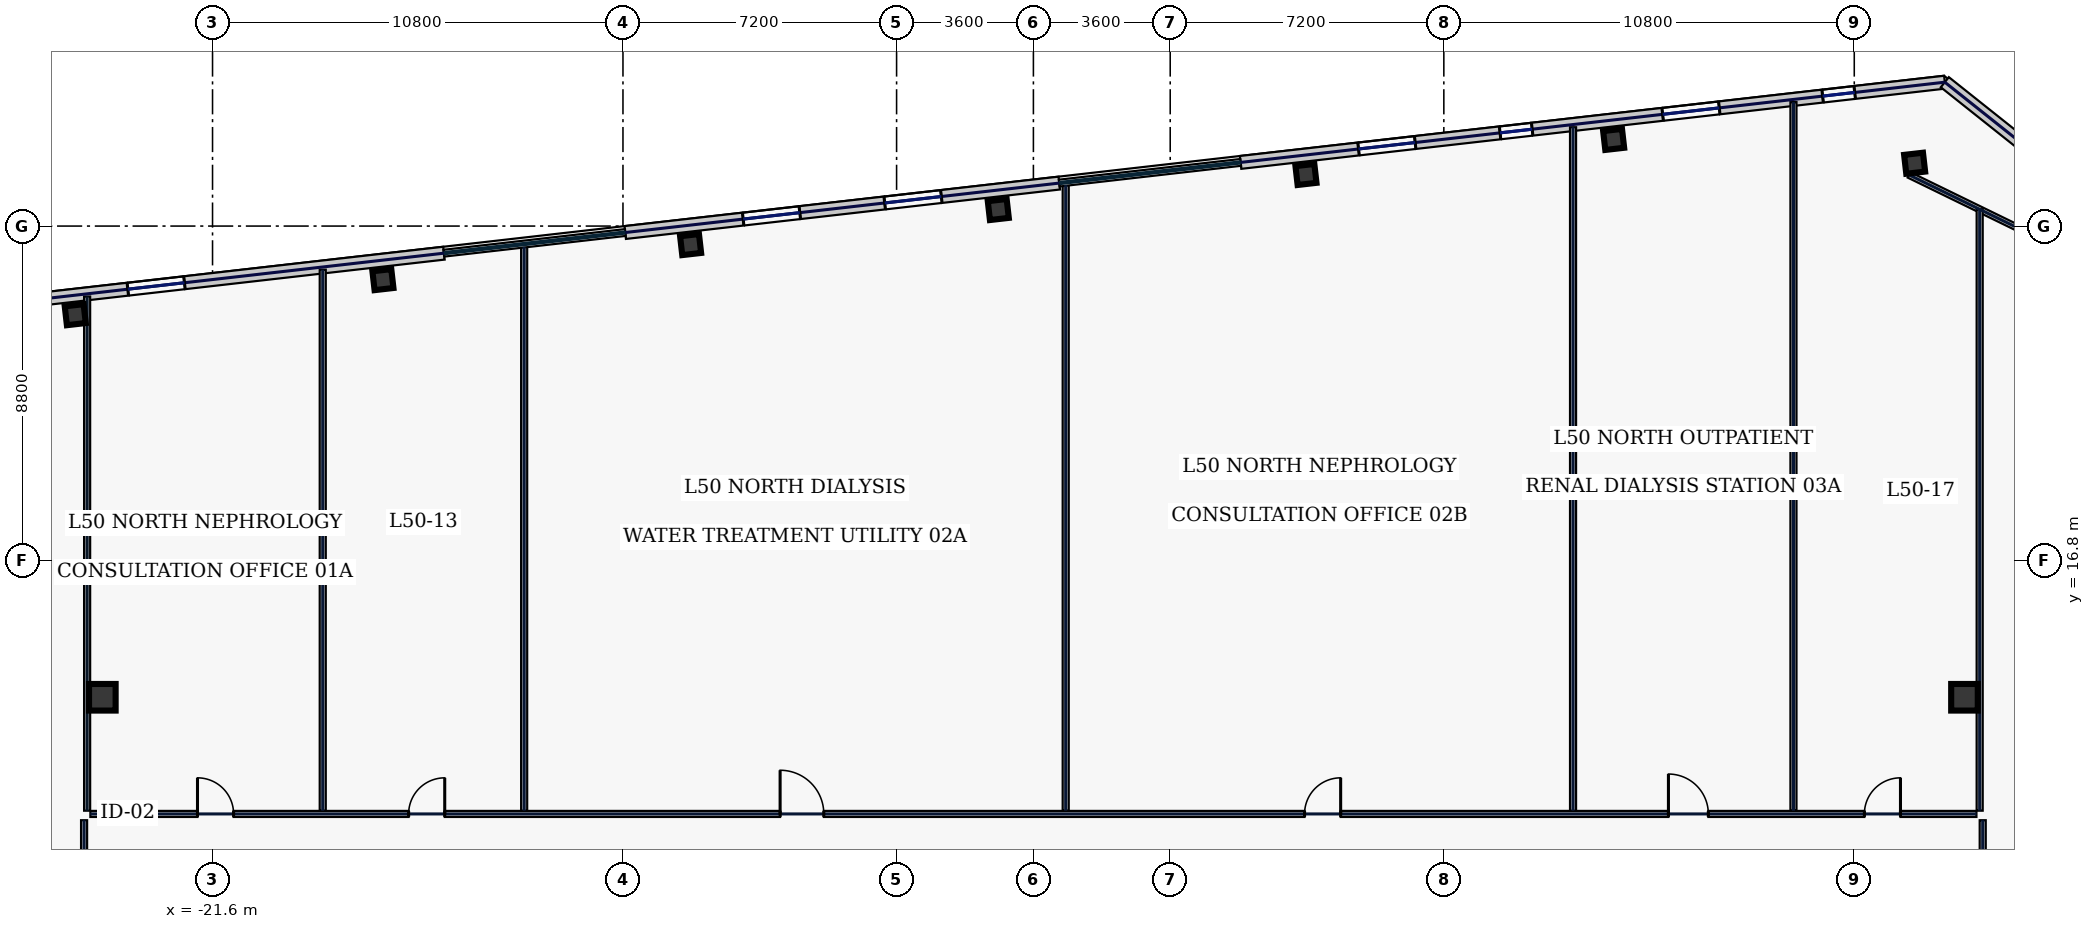
"""IFC4 building model, lengths in metres.
Left out: names, types, materials, properties, quantities, classifications, styles, units other than length and angle.
Written with IfcOpenShell. Run it as: python <this file> out.ifc"""

import sys

from ifc_helpers import new_model, si_unit, direction, frame, frame_2d, origin, origin_2d, place, context, subcontext, project, spatial, rectangle, hollow_rectangle, extrude, element, fill, save


model = new_model("IFC4")
c1 = context("Model", 3, precision=1e-05, world=origin(), true_north=direction((0.0, 1.0)))
c2 = subcontext(c1, "Body", "Model", "MODEL_VIEW")
j1 = project(units=[si_unit("LENGTHUNIT", "METRE"), si_unit("PLANEANGLEUNIT", "RADIAN")], contexts=[c1])
p1 = place(None, origin())
s1 = spatial("IfcSite", under=j1, at=p1, CompositionType="ELEMENT")
p2 = place(p1, origin())
s2 = spatial("IfcBuilding", under=s1, at=p2, CompositionType="ELEMENT")
p3 = place(p2, frame((0.0, 0.0, 218.2)))
s3 = spatial("IfcBuildingStorey", under=s2, at=p3, CompositionType="ELEMENT", Elevation=218.2)
for number, where, z_axis, x_axis in (
    (1, (-24.5, 13.2, 0.0), (0.0, 0.0, 1.0), (1.0, 0.0, 0.0)),
    (2, (24.5, 13.2, 0.0), (0.0, 0.0, 1.0), (1.0, 0.0, 0.0)),
):
    element("IfcColumn", number, at=place(p3, frame(where, z_axis=z_axis, x_axis=x_axis)), inside=s3, PredefinedType="COLUMN", context=c2, shape_type="SweptSolid", body=[
        extrude(hollow_rectangle(XDim=0.7, YDim=0.7, WallThickness=0.032, at=origin_2d()), origin(), (0.0, 0.0, 1.0), 3.74),
    ])
for number, where, z_axis, x_axis in (
    (3, (23.188, 27.253, 0.0), (0.0, 0.0, 1.0), (0.994, 0.113, 0.0)),
    (4, (15.269, 27.88, 0.0), (0.0, 0.0, 1.0), (0.994, 0.113, 0.0)),
    (5, (7.172, 26.958, 0.0), (0.0, 0.0, 1.0), (0.994, 0.113, 0.0)),
    (6, (-0.924, 26.035, 0.0), (0.0, 0.0, 1.0), (0.994, 0.113, 0.0)),
    (7, (-9.02, 25.113, 0.0), (0.0, 0.0, 1.0), (0.994, 0.113, 0.0)),
    (8, (-17.116, 24.19, 0.0), (0.0, 0.0, 1.0), (0.994, 0.113, 0.0)),
    (9, (-25.212, 23.268, 0.0), (0.0, 0.0, 1.0), (0.994, 0.113, 0.0)),
):
    element("IfcColumn", number, at=place(p3, frame(where, z_axis=z_axis, x_axis=x_axis)), inside=s3, PredefinedType="COLUMN", context=c2, shape_type="SweptSolid", body=[
        extrude(hollow_rectangle(XDim=0.5, YDim=0.5, WallThickness=0.025, at=origin_2d()), origin(), (0.0, 0.0, 1.0), 3.74),
    ])
p4 = place(p3, frame((23.983, 29.386, 0.0), z_axis=(0.0, 0.0, 1.0), x_axis=(-0.993572271362, -0.113199565282, 0.0)))
e10 = element("IfcWall", 10, at=p4, inside=s3, PredefinedType="STANDARD", context=c2, shape_type="SweptSolid", body=[
    extrude(rectangle(XDim=18.651, YDim=0.34, at=frame_2d((9.326, 0.0))), origin(), (0.0, 0.0, 1.0), 3.74),
])
p5 = place(p4, frame((14.027, 0.0, 0.83)))
e11 = element("IfcOpeningElement", 11, at=p5, cuts=e10, PredefinedType="OPENING", context=c2, shape_type="SweptSolid", body=[
    extrude(rectangle(XDim=1.5, YDim=2.0, at=frame_2d((0.75, 1.0))), frame((0.0, 0.18, 0.0), z_axis=(0.0, -1.0, 0.0), x_axis=(1.0, 0.0, 0.0)), (0.0, 0.0, 1.0), 0.36),
])
p6 = place(p4, frame((10.929, 0.0, 0.83)))
e12 = element("IfcOpeningElement", 12, at=p6, cuts=e10, PredefinedType="OPENING", context=c2, shape_type="SweptSolid", body=[
    extrude(rectangle(XDim=0.85, YDim=1.85, at=frame_2d((0.425, 0.925))), frame((0.0, 0.18, 0.0), z_axis=(0.0, -1.0, 0.0), x_axis=(1.0, 0.0, 0.0)), (0.0, 0.0, 1.0), 0.36),
])
p7 = place(p4, frame((5.973, 0.0, 0.83)))
e13 = element("IfcOpeningElement", 13, at=p7, cuts=e10, PredefinedType="OPENING", context=c2, shape_type="SweptSolid", body=[
    extrude(rectangle(XDim=1.5, YDim=2.0, at=frame_2d((0.75, 1.0))), frame((0.0, 0.18, 0.0), z_axis=(0.0, -1.0, 0.0), x_axis=(1.0, 0.0, 0.0)), (0.0, 0.0, 1.0), 0.36),
])
p8 = place(p4, frame((2.386, 0.0, 0.83)))
e14 = element("IfcOpeningElement", 14, at=p8, cuts=e10, PredefinedType="OPENING", context=c2, shape_type="SweptSolid", body=[
    extrude(rectangle(XDim=0.85, YDim=1.85, at=frame_2d((0.425, 0.925))), frame((0.0, 0.18, 0.0), z_axis=(0.0, -1.0, 0.0), x_axis=(1.0, 0.0, 0.0)), (0.0, 0.0, 1.0), 0.36),
])
p9 = place(p3, frame((0.682, 26.731, 0.0), z_axis=(0.0, 0.0, 1.0), x_axis=(-0.993571968199, -0.113202226169, 0.0)))
e15 = element("IfcWall", 15, at=p9, inside=s3, PredefinedType="STANDARD", context=c2, shape_type="SweptSolid", body=[
    extrude(rectangle(XDim=11.497, YDim=0.34, at=frame_2d((5.749, 0.0))), origin(), (0.0, 0.0, 1.0), 3.74),
])
p10 = place(p9, frame((6.873, 0.0, 0.83)))
e16 = element("IfcOpeningElement", 16, at=p10, cuts=e15, PredefinedType="OPENING", context=c2, shape_type="SweptSolid", body=[
    extrude(rectangle(XDim=1.5, YDim=2.0, at=frame_2d((0.75, 1.0))), frame((0.0, 0.18, 0.0), z_axis=(0.0, -1.0, 0.0), x_axis=(1.0, 0.0, 0.0)), (0.0, 0.0, 1.0), 0.36),
])
p11 = place(p9, frame((3.125, 0.0, 0.83)))
e17 = element("IfcOpeningElement", 17, at=p11, cuts=e15, PredefinedType="OPENING", context=c2, shape_type="SweptSolid", body=[
    extrude(rectangle(XDim=1.5, YDim=2.0, at=frame_2d((0.75, 1.0))), frame((0.0, 0.18, 0.0), z_axis=(0.0, -1.0, 0.0), x_axis=(1.0, 0.0, 0.0)), (0.0, 0.0, 1.0), 0.36),
])
p12 = place(p3, frame((-15.51, 24.886, 0.0), z_axis=(0.0, 0.0, 1.0), x_axis=(-0.993572271362, -0.113199565282, 0.0)))
e18 = element("IfcWall", 18, at=p12, inside=s3, PredefinedType="STANDARD", context=c2, shape_type="SweptSolid", body=[
    extrude(rectangle(XDim=18.651, YDim=0.34, at=frame_2d((9.326, 0.0))), origin(), (0.0, 0.0, 1.0), 3.74),
])
p13 = place(p12, frame((15.021, 0.0, 0.83)))
e19 = element("IfcOpeningElement", 19, at=p13, cuts=e18, PredefinedType="OPENING", context=c2, shape_type="SweptSolid", body=[
    extrude(rectangle(XDim=1.5, YDim=2.0, at=frame_2d((0.75, 1.0))), frame((0.0, 0.18, 0.0), z_axis=(0.0, -1.0, 0.0), x_axis=(1.0, 0.0, 0.0)), (0.0, 0.0, 1.0), 0.36),
])
p14 = place(p12, frame((11.273, 0.0, 0.83)))
e20 = element("IfcOpeningElement", 20, at=p14, cuts=e18, PredefinedType="OPENING", context=c2, shape_type="SweptSolid", body=[
    extrude(rectangle(XDim=1.5, YDim=2.0, at=frame_2d((0.75, 1.0))), frame((0.0, 0.18, 0.0), z_axis=(0.0, -1.0, 0.0), x_axis=(1.0, 0.0, 0.0)), (0.0, 0.0, 1.0), 0.36),
])
p15 = place(p12, frame((6.873, 0.0, 0.83)))
e21 = element("IfcOpeningElement", 21, at=p15, cuts=e18, PredefinedType="OPENING", context=c2, shape_type="SweptSolid", body=[
    extrude(rectangle(XDim=1.5, YDim=2.0, at=frame_2d((0.75, 1.0))), frame((0.0, 0.18, 0.0), z_axis=(0.0, -1.0, 0.0), x_axis=(1.0, 0.0, 0.0)), (0.0, 0.0, 1.0), 0.36),
])
p16 = place(p3, frame((29.107, 25.31, 0.0), z_axis=(0.0, 0.0, 1.0), x_axis=(-0.78259733853, 0.62252823689, 0.0)))
e22 = element("IfcWall", 22, at=p16, inside=s3, PredefinedType="STANDARD", context=c2, shape_type="SweptSolid", body=[
    extrude(rectangle(XDim=6.548, YDim=0.34, at=frame_2d((3.274, 0.0))), origin(), (0.0, 0.0, 1.0), 3.74),
])
p17 = place(p3, frame((28.528, 24.271, 0.0), z_axis=(0.0, 0.0, 1.0), x_axis=(-0.898820692789, 0.438316509173, 0.0)))
e23 = element("IfcWall", 23, at=p17, inside=s3, PredefinedType="PARTITIONING", context=c2, shape_type="SweptSolid", body=[
    extrude(rectangle(XDim=6.107, YDim=0.16, at=frame_2d((3.053, 0.0))), origin(), (0.0, 0.0, 1.0), 3.74),
])
p18 = place(p3, frame((-24.98, 6.985, 0.0), z_axis=(0.0, 0.0, 1.0), x_axis=(0.0, 1.0, 0.0)))
e24 = element("IfcWall", 24, at=p18, inside=s3, PredefinedType="PARTITIONING", context=c2, shape_type="SweptSolid", body=[
    extrude(rectangle(XDim=2.98, YDim=0.16, at=frame_2d((1.49, 0.0))), origin(), (0.0, 0.0, 1.0), 3.74),
])
p19 = place(p18, frame((1.1, 0.0, 0.0)))
e25 = element("IfcOpeningElement", 25, at=p19, cuts=e24, PredefinedType="OPENING", context=c2, shape_type="SweptSolid", body=[
    extrude(rectangle(XDim=0.95, YDim=2.2, at=frame_2d((0.475, 1.1))), frame((0.0, 0.09, 0.0), z_axis=(0.0, -1.0, 0.0), x_axis=(1.0, 0.0, 0.0)), (0.0, 0.0, 1.0), 0.18),
])
p20 = place(p3, frame((-24.815, 10.13, 0.0), z_axis=(0.0, 0.0, 1.0), x_axis=(1.0, 0.0, 0.0)))
e26 = element("IfcWall", 26, at=p20, inside=s3, PredefinedType="PARTITIONING", context=c2, shape_type="SweptSolid", body=[
    extrude(rectangle(XDim=49.63, YDim=0.16, at=frame_2d((24.815, 0.0))), origin(), (0.0, 0.0, 1.0), 3.74),
])
p21 = place(p20, frame((2.819, 0.0, 0.0)))
e27 = element("IfcOpeningElement", 27, at=p21, cuts=e26, PredefinedType="OPENING", context=c2, shape_type="SweptSolid", body=[
    extrude(rectangle(XDim=0.95, YDim=2.2, at=frame_2d((0.475, 1.1))), frame((0.0, 0.09, 0.0), z_axis=(0.0, -1.0, 0.0), x_axis=(1.0, 0.0, 0.0)), (0.0, 0.0, 1.0), 0.18),
])
p22 = place(p20, frame((8.375, 0.0, 0.0)))
e28 = element("IfcOpeningElement", 28, at=p22, cuts=e26, PredefinedType="OPENING", context=c2, shape_type="SweptSolid", body=[
    extrude(rectangle(XDim=0.95, YDim=2.2, at=frame_2d((0.475, 1.1))), frame((0.0, 0.09, 0.0), z_axis=(0.0, -1.0, 0.0), x_axis=(1.0, 0.0, 0.0)), (0.0, 0.0, 1.0), 0.18),
])
p23 = place(p20, frame((18.15, 0.0, 0.0)))
e29 = element("IfcOpeningElement", 29, at=p23, cuts=e26, PredefinedType="OPENING", context=c2, shape_type="SweptSolid", body=[
    extrude(rectangle(XDim=1.15, YDim=2.2, at=frame_2d((0.575, 1.1))), frame((0.0, 0.09, 0.0), z_axis=(0.0, -1.0, 0.0), x_axis=(1.0, 0.0, 0.0)), (0.0, 0.0, 1.0), 0.18),
])
p24 = place(p20, frame((31.95, 0.0, 0.0)))
e30 = element("IfcOpeningElement", 30, at=p24, cuts=e26, PredefinedType="OPENING", context=c2, shape_type="SweptSolid", body=[
    extrude(rectangle(XDim=0.95, YDim=2.2, at=frame_2d((0.475, 1.1))), frame((0.0, 0.09, 0.0), z_axis=(0.0, -1.0, 0.0), x_axis=(1.0, 0.0, 0.0)), (0.0, 0.0, 1.0), 0.18),
])
p25 = place(p20, frame((41.525, 0.0, 0.0)))
e31 = element("IfcOpeningElement", 31, at=p25, cuts=e26, PredefinedType="OPENING", context=c2, shape_type="SweptSolid", body=[
    extrude(rectangle(XDim=1.05, YDim=2.2, at=frame_2d((0.525, 1.1))), frame((0.0, 0.09, 0.0), z_axis=(0.0, -1.0, 0.0), x_axis=(1.0, 0.0, 0.0)), (0.0, 0.0, 1.0), 0.18),
])
p26 = place(p20, frame((46.681, 0.0, 0.0)))
e32 = element("IfcOpeningElement", 32, at=p26, cuts=e26, PredefinedType="OPENING", context=c2, shape_type="SweptSolid", body=[
    extrude(rectangle(XDim=0.95, YDim=2.2, at=frame_2d((0.475, 1.1))), frame((0.0, 0.09, 0.0), z_axis=(0.0, -1.0, 0.0), x_axis=(1.0, 0.0, 0.0)), (0.0, 0.0, 1.0), 0.18),
])
p27 = place(p3, frame((24.98, 9.965, 0.0), z_axis=(0.0, 0.0, 1.0), x_axis=(0.0, -1.0, 0.0)))
e33 = element("IfcWall", 33, at=p27, inside=s3, PredefinedType="PARTITIONING", context=c2, shape_type="SweptSolid", body=[
    extrude(rectangle(XDim=2.98, YDim=0.16, at=frame_2d((1.49, 0.0))), origin(), (0.0, 0.0, 1.0), 3.74),
])
p28 = place(p27, frame((1.1, 0.0, 0.0)))
e34 = element("IfcOpeningElement", 34, at=p28, cuts=e33, PredefinedType="OPENING", context=c2, shape_type="SweptSolid", body=[
    extrude(rectangle(XDim=0.95, YDim=2.2, at=frame_2d((0.475, 1.1))), frame((0.0, 0.09, 0.0), z_axis=(0.0, -1.0, 0.0), x_axis=(1.0, 0.0, 0.0)), (0.0, 0.0, 1.0), 0.18),
])
p29 = place(p3, frame((-24.9, 10.215, 0.0), z_axis=(0.0, 0.0, 1.0), x_axis=(0.0, 1.0, 0.0)))
e35 = element("IfcWall", 35, at=p29, inside=s3, PredefinedType="PARTITIONING", context=c2, shape_type="SweptSolid", body=[
    extrude(rectangle(XDim=13.531, YDim=0.16, at=frame_2d((6.766, 0.0))), origin(), (0.0, 0.0, 1.0), 3.285),
])
p30 = place(p3, frame((24.9, 10.215, 0.0), z_axis=(0.0, 0.0, 1.0), x_axis=(0.0, 1.0, 0.0)))
e36 = element("IfcWall", 36, at=p30, inside=s3, PredefinedType="PARTITIONING", context=c2, shape_type="SweptSolid", body=[
    extrude(rectangle(XDim=15.829, YDim=0.16, at=frame_2d((7.915, 0.0))), origin(), (0.0, 0.0, 1.0), 3.74),
])
p31 = place(p3, frame((-13.4, 10.215, 0.0), z_axis=(0.0, 0.0, 1.0), x_axis=(0.0, 1.0, 0.0)))
e37 = element("IfcWall", 37, at=p31, inside=s3, PredefinedType="PARTITIONING", context=c2, shape_type="SweptSolid", body=[
    extrude(rectangle(XDim=14.841, YDim=0.16, at=frame_2d((7.421, 0.0))), origin(), (0.0, 0.0, 1.0), 3.74),
])
p32 = place(p3, frame((14.2, 10.215, 0.0), z_axis=(0.0, 0.0, 1.0), x_axis=(0.0, 1.0, 0.0)))
e38 = element("IfcWall", 38, at=p32, inside=s3, PredefinedType="PARTITIONING", context=c2, shape_type="SweptSolid", body=[
    extrude(rectangle(XDim=17.986, YDim=0.16, at=frame_2d((8.993, 0.0))), origin(), (0.0, 0.0, 1.0), 3.74),
])
p33 = place(p3, frame((-18.7, 10.215, 0.0), z_axis=(0.0, 0.0, 1.0), x_axis=(0.0, 1.0, 0.0)))
e39 = element("IfcWall", 39, at=p33, inside=s3, PredefinedType="PARTITIONING", context=c2, shape_type="SweptSolid", body=[
    extrude(rectangle(XDim=14.238, YDim=0.16, at=frame_2d((7.119, 0.0))), origin(), (0.0, 0.0, 1.0), 3.74),
])
p34 = place(p3, frame((0.85, 10.215, 0.0), z_axis=(0.0, 0.0, 1.0), x_axis=(0.0, 1.0, 0.0)))
e40 = element("IfcWall", 40, at=p34, inside=s3, PredefinedType="PARTITIONING", context=c2, shape_type="SweptSolid", body=[
    extrude(rectangle(XDim=16.465, YDim=0.16, at=frame_2d((8.232, 0.0))), origin(), (0.0, 0.0, 1.0), 3.74),
])
p35 = place(p3, frame((20.0, 10.215, 0.0), z_axis=(0.0, 0.0, 1.0), x_axis=(0.0, 1.0, 0.0)))
e41 = element("IfcWall", 41, at=p35, inside=s3, PredefinedType="PARTITIONING", context=c2, shape_type="SweptSolid", body=[
    extrude(rectangle(XDim=18.647, YDim=0.16, at=frame_2d((9.323, 0.0))), origin(), (0.0, 0.0, 1.0), 3.74),
])
p36 = place(p5, origin())
e42 = element("IfcWindow", 42, at=p36, inside=s3, PartitioningType="SINGLE_PANEL", PredefinedType="WINDOW", context=c2, shape_type="SweptSolid", body=[
    extrude(rectangle(XDim=1.5, YDim=2.0, at=frame_2d((0.75, 1.0))), frame((0.0, 0.03, 0.0), z_axis=(0.0, -1.0, 0.0), x_axis=(1.0, 0.0, 0.0)), (0.0, 0.0, 1.0), 0.06),
])
fill(e11, e42)
p37 = place(p6, origin())
e43 = element("IfcWindow", 43, at=p37, inside=s3, PartitioningType="SINGLE_PANEL", PredefinedType="WINDOW", context=c2, shape_type="SweptSolid", body=[
    extrude(rectangle(XDim=0.85, YDim=1.85, at=frame_2d((0.425, 0.925))), frame((0.0, 0.03, 0.0), z_axis=(0.0, -1.0, 0.0), x_axis=(1.0, 0.0, 0.0)), (0.0, 0.0, 1.0), 0.06),
])
fill(e12, e43)
p38 = place(p7, origin())
e44 = element("IfcWindow", 44, at=p38, inside=s3, PartitioningType="SINGLE_PANEL", PredefinedType="WINDOW", context=c2, shape_type="SweptSolid", body=[
    extrude(rectangle(XDim=1.5, YDim=2.0, at=frame_2d((0.75, 1.0))), frame((0.0, 0.03, 0.0), z_axis=(0.0, -1.0, 0.0), x_axis=(1.0, 0.0, 0.0)), (0.0, 0.0, 1.0), 0.06),
])
fill(e13, e44)
p39 = place(p8, origin())
e45 = element("IfcWindow", 45, at=p39, inside=s3, PartitioningType="SINGLE_PANEL", PredefinedType="WINDOW", context=c2, shape_type="SweptSolid", body=[
    extrude(rectangle(XDim=0.85, YDim=1.85, at=frame_2d((0.425, 0.925))), frame((0.0, 0.03, 0.0), z_axis=(0.0, -1.0, 0.0), x_axis=(1.0, 0.0, 0.0)), (0.0, 0.0, 1.0), 0.06),
])
fill(e14, e45)
p40 = place(p10, origin())
e46 = element("IfcWindow", 46, at=p40, inside=s3, PartitioningType="SINGLE_PANEL", PredefinedType="WINDOW", context=c2, shape_type="SweptSolid", body=[
    extrude(rectangle(XDim=1.5, YDim=2.0, at=frame_2d((0.75, 1.0))), frame((0.0, 0.03, 0.0), z_axis=(0.0, -1.0, 0.0), x_axis=(1.0, 0.0, 0.0)), (0.0, 0.0, 1.0), 0.06),
])
fill(e16, e46)
p41 = place(p11, origin())
e47 = element("IfcWindow", 47, at=p41, inside=s3, PartitioningType="SINGLE_PANEL", PredefinedType="WINDOW", context=c2, shape_type="SweptSolid", body=[
    extrude(rectangle(XDim=1.5, YDim=2.0, at=frame_2d((0.75, 1.0))), frame((0.0, 0.03, 0.0), z_axis=(0.0, -1.0, 0.0), x_axis=(1.0, 0.0, 0.0)), (0.0, 0.0, 1.0), 0.06),
])
fill(e17, e47)
p42 = place(p15, origin())
e48 = element("IfcWindow", 48, at=p42, inside=s3, PartitioningType="SINGLE_PANEL", PredefinedType="WINDOW", context=c2, shape_type="SweptSolid", body=[
    extrude(rectangle(XDim=1.5, YDim=2.0, at=frame_2d((0.75, 1.0))), frame((0.0, 0.03, 0.0), z_axis=(0.0, -1.0, 0.0), x_axis=(1.0, 0.0, 0.0)), (0.0, 0.0, 1.0), 0.06),
])
fill(e21, e48)
p43 = place(p21, origin())
e49 = element("IfcDoor", 49, at=p43, inside=s3, OperationType="SINGLE_SWING_LEFT", PredefinedType="DOOR", context=c2, shape_type="SweptSolid", body=[
    extrude(rectangle(XDim=0.95, YDim=2.2, at=frame_2d((0.475, 1.1))), frame((0.0, 0.025, 0.0), z_axis=(0.0, -1.0, 0.0), x_axis=(1.0, 0.0, 0.0)), (0.0, 0.0, 1.0), 0.05),
])
fill(e27, e49)
p44 = place(p22, origin())
e50 = element("IfcDoor", 50, at=p44, inside=s3, OperationType="SINGLE_SWING_RIGHT", PredefinedType="DOOR", context=c2, shape_type="SweptSolid", body=[
    extrude(rectangle(XDim=0.95, YDim=2.2, at=frame_2d((0.475, 1.1))), frame((0.0, 0.025, 0.0), z_axis=(0.0, -1.0, 0.0), x_axis=(1.0, 0.0, 0.0)), (0.0, 0.0, 1.0), 0.05),
])
fill(e28, e50)
p45 = place(p23, origin())
e51 = element("IfcDoor", 51, at=p45, inside=s3, OperationType="SINGLE_SWING_LEFT", PredefinedType="DOOR", context=c2, shape_type="SweptSolid", body=[
    extrude(rectangle(XDim=1.15, YDim=2.2, at=frame_2d((0.575, 1.1))), frame((0.0, 0.025, 0.0), z_axis=(0.0, -1.0, 0.0), x_axis=(1.0, 0.0, 0.0)), (0.0, 0.0, 1.0), 0.05),
])
fill(e29, e51)
p46 = place(p24, origin())
e52 = element("IfcDoor", 52, at=p46, inside=s3, OperationType="SINGLE_SWING_RIGHT", PredefinedType="DOOR", context=c2, shape_type="SweptSolid", body=[
    extrude(rectangle(XDim=0.95, YDim=2.2, at=frame_2d((0.475, 1.1))), frame((0.0, 0.025, 0.0), z_axis=(0.0, -1.0, 0.0), x_axis=(1.0, 0.0, 0.0)), (0.0, 0.0, 1.0), 0.05),
])
fill(e30, e52)
p47 = place(p25, origin())
e53 = element("IfcDoor", 53, at=p47, inside=s3, OperationType="SINGLE_SWING_LEFT", PredefinedType="DOOR", context=c2, shape_type="SweptSolid", body=[
    extrude(rectangle(XDim=1.05, YDim=2.2, at=frame_2d((0.525, 1.1))), frame((0.0, 0.025, 0.0), z_axis=(0.0, -1.0, 0.0), x_axis=(1.0, 0.0, 0.0)), (0.0, 0.0, 1.0), 0.05),
])
fill(e31, e53)
p48 = place(p26, origin())
e54 = element("IfcDoor", 54, at=p48, inside=s3, OperationType="SINGLE_SWING_RIGHT", PredefinedType="DOOR", context=c2, shape_type="SweptSolid", body=[
    extrude(rectangle(XDim=0.95, YDim=2.2, at=frame_2d((0.475, 1.1))), frame((0.0, 0.025, 0.0), z_axis=(0.0, -1.0, 0.0), x_axis=(1.0, 0.0, 0.0)), (0.0, 0.0, 1.0), 0.05),
])
fill(e32, e54)
save(model, sys.argv[1])
